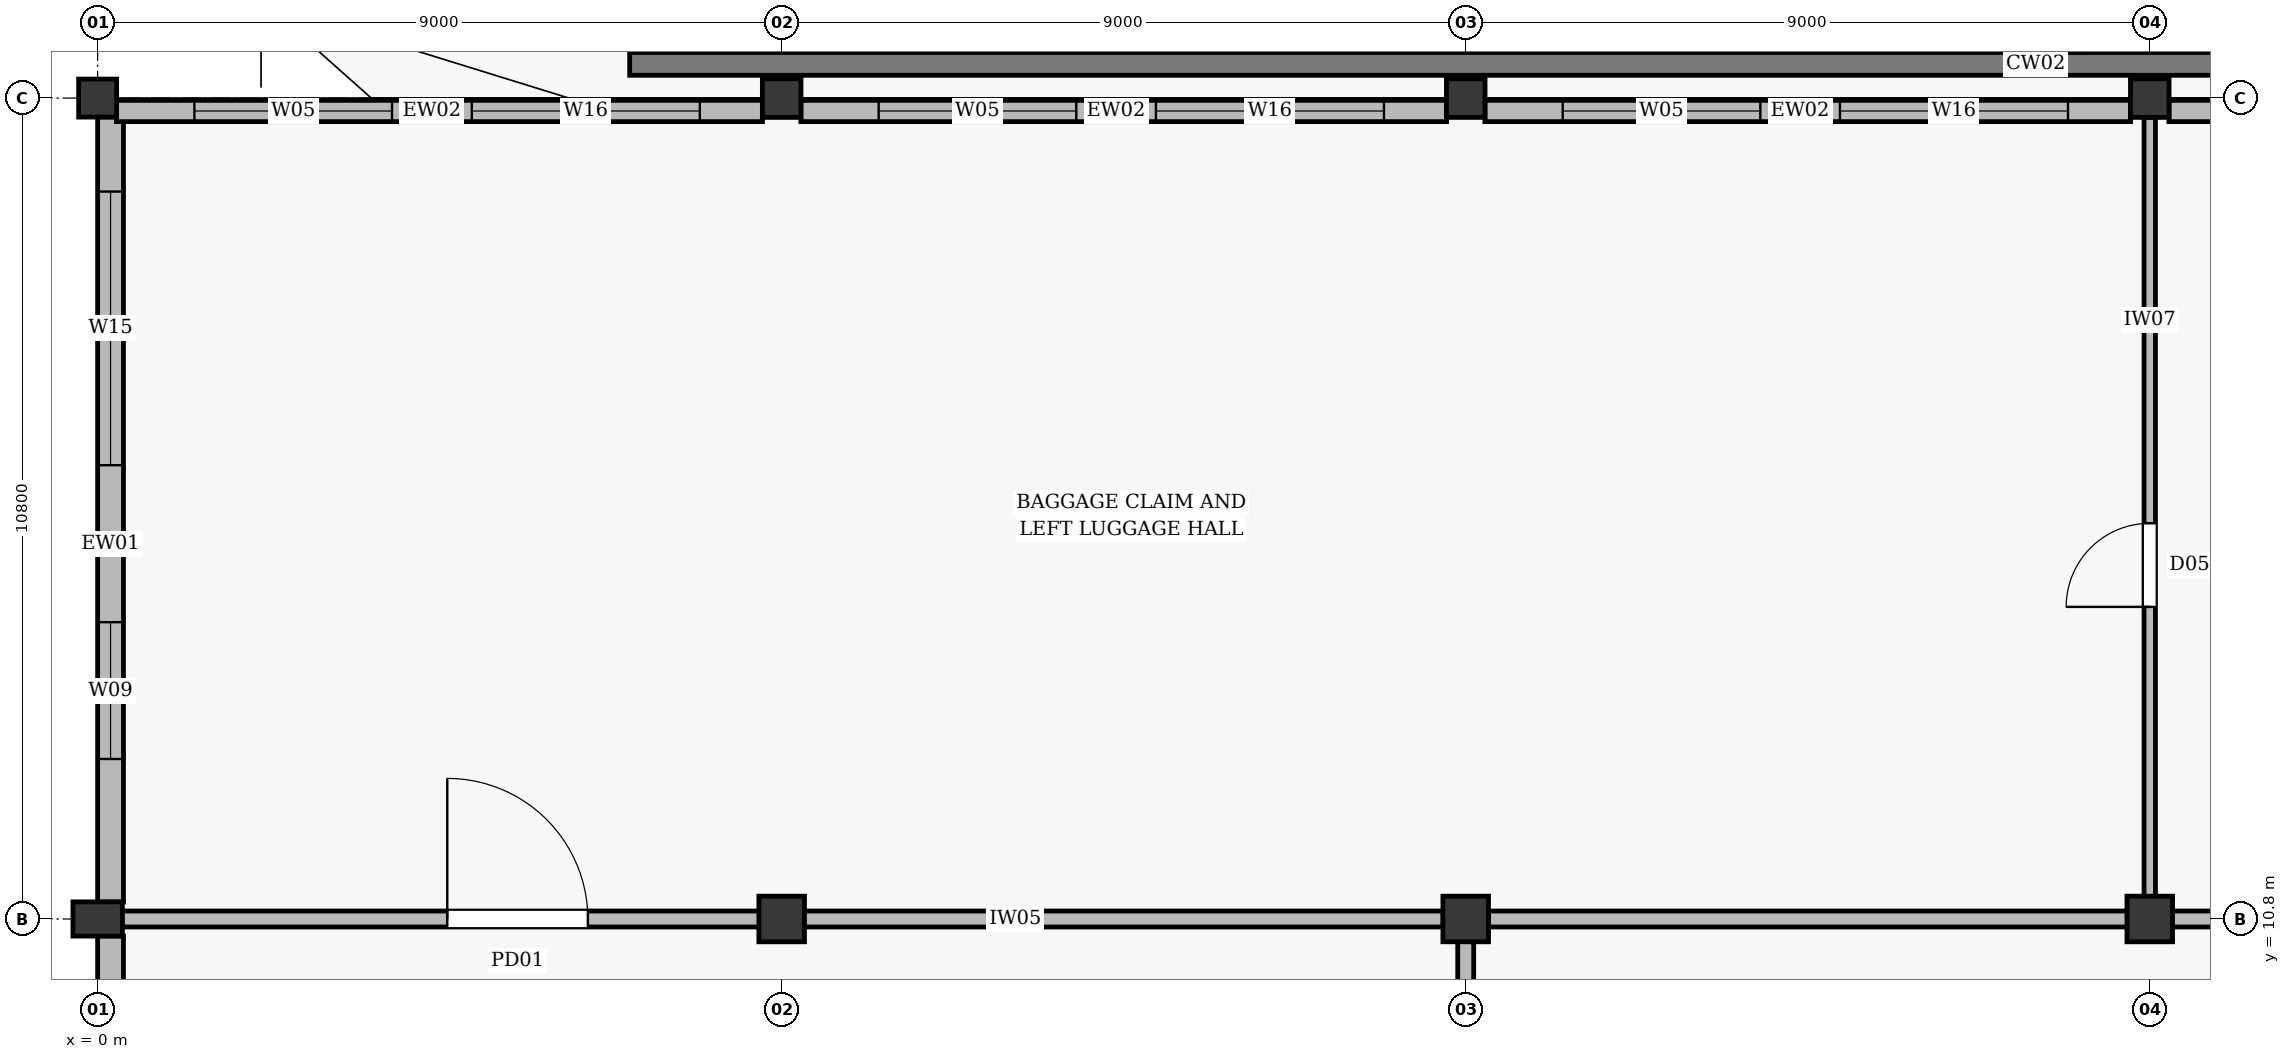
"""IFC4 building model, lengths in metres.
Left out: names, types, materials, properties, quantities, classifications, styles, units other than length and angle.
Written with IfcOpenShell. Run it as: python <this file> out.ifc"""

import sys

from ifc_helpers import new_model, si_unit, direction, frame, frame_2d, origin, origin_2d, place, context, subcontext, project, spatial, rectangle, hollow_rectangle, hollow_circle, extrude, element, fill, save


model = new_model("IFC4")
c1 = context("Model", 3, precision=1e-05, world=origin(), true_north=direction((0.0, 1.0)))
c2 = subcontext(c1, "Body", "Model", "MODEL_VIEW")
j1 = project(units=[si_unit("LENGTHUNIT", "METRE"), si_unit("PLANEANGLEUNIT", "RADIAN")], contexts=[c1])
p1 = place(None, origin())
s1 = spatial("IfcSite", under=j1, at=p1, CompositionType="ELEMENT")
p2 = place(p1, origin())
s2 = spatial("IfcBuilding", under=s1, at=p2, CompositionType="ELEMENT")
p3 = place(p2, origin())
s3 = spatial("IfcBuildingStorey", under=s2, at=p3, CompositionType="ELEMENT", Elevation=0.0)
p4 = place(p3, frame((0.0, 21.6, 0.0), z_axis=(0.0, 0.0, 1.0), x_axis=(1.0, 0.0, 0.0)))
e1 = element("IfcColumn", 1, at=p4, inside=s3, PredefinedType="COLUMN", context=c2, shape_type="SweptSolid", body=[
    extrude(hollow_rectangle(XDim=0.5, YDim=0.5, WallThickness=0.02, at=origin_2d()), origin(), (0.0, 0.0, 1.0), 6.6),
])
for number, where, z_axis, x_axis in (
    (2, (9.0, 21.6, 0.0), (0.0, 0.0, 1.0), (1.0, 0.0, 0.0)),
    (3, (18.0, 21.6, 0.0), (0.0, 0.0, 1.0), (1.0, 0.0, 0.0)),
    (4, (27.0, 21.6, 0.0), (0.0, 0.0, 1.0), (1.0, 0.0, 0.0)),
):
    element("IfcColumn", number, at=place(p3, frame(where, z_axis=z_axis, x_axis=x_axis)), inside=s3, PredefinedType="COLUMN", context=c2, shape_type="SweptSolid", body=[
        extrude(hollow_circle(Radius=0.254, WallThickness=0.016, at=origin_2d()), origin(), (0.0, 0.0, 1.0), 6.6),
    ])
p5 = place(p3, frame((0.0, 10.8, 0.0), z_axis=(0.0, 0.0, 1.0), x_axis=(1.0, 0.0, 0.0)))
e5 = element("IfcColumn", 5, at=p5, inside=s3, PredefinedType="PILASTER", context=c2, shape_type="SweptSolid", body=[
    extrude(rectangle(XDim=0.65, YDim=0.45, at=origin_2d()), origin(), (0.0, 0.0, 1.0), 6.6),
])
for number, where, z_axis, x_axis in (
    (6, (9.0, 10.8, 0.0), (0.0, 0.0, 1.0), (1.0, 0.0, 0.0)),
    (7, (18.0, 10.8, 0.0), (0.0, 0.0, 1.0), (1.0, 0.0, 0.0)),
    (8, (27.0, 10.8, 0.0), (0.0, 0.0, 1.0), (1.0, 0.0, 0.0)),
):
    element("IfcColumn", number, at=place(p3, frame(where, z_axis=z_axis, x_axis=x_axis)), inside=s3, PredefinedType="COLUMN", context=c2, shape_type="SweptSolid", body=[
        extrude(rectangle(XDim=0.6, YDim=0.6, at=origin_2d()), origin(), (0.0, 0.0, 1.0), 6.6),
    ])
p6 = place(p3, frame((7.0, 22.05, 0.0), z_axis=(0.0, 0.0, 1.0), x_axis=(1.0, 0.0, 0.0)))
e9 = element("IfcWall", 9, at=p6, inside=s3, PredefinedType="SOLIDWALL", context=c2, shape_type="SweptSolid", body=[
    extrude(rectangle(XDim=37.0, YDim=0.3, at=frame_2d((18.5, 0.0))), origin(), (0.0, 0.0, 1.0), 0.375),
])
p7 = place(p3, frame((26.0, 22.2, 0.0), z_axis=(0.0, 0.0, 1.0), x_axis=(0.0, 1.0, 0.0)))
e10 = element("IfcWall", 10, at=p7, inside=s3, PredefinedType="SOLIDWALL", context=c2, shape_type="SweptSolid", body=[
    extrude(rectangle(XDim=4.8, YDim=0.3, at=frame_2d((2.4, 0.0))), origin(), (0.0, 0.0, 1.0), 0.375),
])
p8 = place(p3, frame((0.17, 0.223, 0.0), z_axis=(0.0, 0.0, 1.0), x_axis=(0.0, 1.0, 0.0)))
e11 = element("IfcWall", 11, at=p8, inside=s3, PredefinedType="STANDARD", context=c2, shape_type="SweptSolid", body=[
    extrude(rectangle(XDim=10.354, YDim=0.34, at=frame_2d((5.177, 0.0))), origin(), (0.0, 0.0, 1.0), 5.55),
])
p9 = place(p8, frame((1.888, 0.0, 0.75)))
e12 = element("IfcOpeningElement", 12, at=p9, cuts=e11, PredefinedType="OPENING", context=c2, shape_type="SweptSolid", body=[
    extrude(rectangle(XDim=1.8, YDim=2.2, at=frame_2d((0.9, 1.1))), frame((0.0, 0.182, 0.0), z_axis=(0.0, -1.0, 0.0), x_axis=(1.0, 0.0, 0.0)), (0.0, 0.0, 1.0), 0.364),
])
p10 = place(p8, frame((5.765, 0.0, 1.05)))
e13 = element("IfcOpeningElement", 13, at=p10, cuts=e11, PredefinedType="OPENING", context=c2, shape_type="SweptSolid", body=[
    extrude(rectangle(XDim=3.6, YDim=1.4, at=frame_2d((1.8, 0.7))), frame((0.0, 0.182, 0.0), z_axis=(0.0, -1.0, 0.0), x_axis=(1.0, 0.0, 0.0)), (0.0, 0.0, 1.0), 0.364),
])
p11 = place(p3, frame((0.17, 11.023, 0.0), z_axis=(0.0, 0.0, 1.0), x_axis=(0.0, 1.0, 0.0)))
e14 = element("IfcWall", 14, at=p11, inside=s3, PredefinedType="STANDARD", context=c2, shape_type="SweptSolid", body=[
    extrude(rectangle(XDim=10.329, YDim=0.34, at=frame_2d((5.165, 0.0))), origin(), (0.0, 0.0, 1.0), 5.55),
])
p12 = place(p11, frame((1.882, 0.0, 0.75)))
e15 = element("IfcOpeningElement", 15, at=p12, cuts=e14, PredefinedType="OPENING", context=c2, shape_type="SweptSolid", body=[
    extrude(rectangle(XDim=1.8, YDim=2.2, at=frame_2d((0.9, 1.1))), frame((0.0, 0.182, 0.0), z_axis=(0.0, -1.0, 0.0), x_axis=(1.0, 0.0, 0.0)), (0.0, 0.0, 1.0), 0.364),
])
p13 = place(p11, frame((5.747, 0.0, 1.05)))
e16 = element("IfcOpeningElement", 16, at=p13, cuts=e14, PredefinedType="OPENING", context=c2, shape_type="SweptSolid", body=[
    extrude(rectangle(XDim=3.6, YDim=1.4, at=frame_2d((1.8, 0.7))), frame((0.0, 0.182, 0.0), z_axis=(0.0, -1.0, 0.0), x_axis=(1.0, 0.0, 0.0)), (0.0, 0.0, 1.0), 0.364),
])
p14 = place(p3, frame((0.248, 21.43, 0.0), z_axis=(0.0, 0.0, 1.0), x_axis=(1.0, 0.0, 0.0)))
e17 = element("IfcWall", 17, at=p14, inside=s3, PredefinedType="STANDARD", context=c2, shape_type="SweptSolid", body=[
    extrude(rectangle(XDim=8.5, YDim=0.28, at=frame_2d((4.25, 0.0))), origin(), (0.0, 0.0, 1.0), 5.55),
])
p15 = place(p14, frame((1.025, 0.0, 0.75)))
e18 = element("IfcOpeningElement", 18, at=p15, cuts=e17, PredefinedType="OPENING", context=c2, shape_type="SweptSolid", body=[
    extrude(rectangle(XDim=2.6, YDim=2.4, at=frame_2d((1.3, 1.2))), frame((0.0, 0.152, 0.0), z_axis=(0.0, -1.0, 0.0), x_axis=(1.0, 0.0, 0.0)), (0.0, 0.0, 1.0), 0.304),
])
p16 = place(p14, frame((4.675, 0.0, 1.05)))
e19 = element("IfcOpeningElement", 19, at=p16, cuts=e17, PredefinedType="OPENING", context=c2, shape_type="SweptSolid", body=[
    extrude(rectangle(XDim=3.0, YDim=1.2, at=frame_2d((1.5, 0.6))), frame((0.0, 0.152, 0.0), z_axis=(0.0, -1.0, 0.0), x_axis=(1.0, 0.0, 0.0)), (0.0, 0.0, 1.0), 0.304),
])
p17 = place(p3, frame((9.252, 21.43, 0.0), z_axis=(0.0, 0.0, 1.0), x_axis=(1.0, 0.0, 0.0)))
e20 = element("IfcWall", 20, at=p17, inside=s3, PredefinedType="STANDARD", context=c2, shape_type="SweptSolid", body=[
    extrude(rectangle(XDim=8.496, YDim=0.28, at=frame_2d((4.248, 0.0))), origin(), (0.0, 0.0, 1.0), 5.55),
])
p18 = place(p17, frame((1.024, 0.0, 0.75)))
e21 = element("IfcOpeningElement", 21, at=p18, cuts=e20, PredefinedType="OPENING", context=c2, shape_type="SweptSolid", body=[
    extrude(rectangle(XDim=2.6, YDim=2.4, at=frame_2d((1.3, 1.2))), frame((0.0, 0.152, 0.0), z_axis=(0.0, -1.0, 0.0), x_axis=(1.0, 0.0, 0.0)), (0.0, 0.0, 1.0), 0.304),
])
p19 = place(p17, frame((4.672, 0.0, 1.05)))
e22 = element("IfcOpeningElement", 22, at=p19, cuts=e20, PredefinedType="OPENING", context=c2, shape_type="SweptSolid", body=[
    extrude(rectangle(XDim=3.0, YDim=1.2, at=frame_2d((1.5, 0.6))), frame((0.0, 0.152, 0.0), z_axis=(0.0, -1.0, 0.0), x_axis=(1.0, 0.0, 0.0)), (0.0, 0.0, 1.0), 0.304),
])
p20 = place(p3, frame((18.252, 21.43, 0.0), z_axis=(0.0, 0.0, 1.0), x_axis=(1.0, 0.0, 0.0)))
e23 = element("IfcWall", 23, at=p20, inside=s3, PredefinedType="STANDARD", context=c2, shape_type="SweptSolid", body=[
    extrude(rectangle(XDim=8.496, YDim=0.28, at=frame_2d((4.248, 0.0))), origin(), (0.0, 0.0, 1.0), 5.55),
])
p21 = place(p20, frame((1.024, 0.0, 0.75)))
e24 = element("IfcOpeningElement", 24, at=p21, cuts=e23, PredefinedType="OPENING", context=c2, shape_type="SweptSolid", body=[
    extrude(rectangle(XDim=2.6, YDim=2.4, at=frame_2d((1.3, 1.2))), frame((0.0, 0.152, 0.0), z_axis=(0.0, -1.0, 0.0), x_axis=(1.0, 0.0, 0.0)), (0.0, 0.0, 1.0), 0.304),
])
p22 = place(p20, frame((4.672, 0.0, 1.05)))
e25 = element("IfcOpeningElement", 25, at=p22, cuts=e23, PredefinedType="OPENING", context=c2, shape_type="SweptSolid", body=[
    extrude(rectangle(XDim=3.0, YDim=1.2, at=frame_2d((1.5, 0.6))), frame((0.0, 0.152, 0.0), z_axis=(0.0, -1.0, 0.0), x_axis=(1.0, 0.0, 0.0)), (0.0, 0.0, 1.0), 0.304),
])
p23 = place(p3, frame((27.252, 21.43, 0.0), z_axis=(0.0, 0.0, 1.0), x_axis=(1.0, 0.0, 0.0)))
e26 = element("IfcWall", 26, at=p23, inside=s3, PredefinedType="STANDARD", context=c2, shape_type="SweptSolid", body=[
    extrude(rectangle(XDim=8.496, YDim=0.28, at=frame_2d((4.248, 0.0))), origin(), (0.0, 0.0, 1.0), 5.55),
])
p24 = place(p23, frame((1.024, 0.0, 0.75)))
e27 = element("IfcOpeningElement", 27, at=p24, cuts=e26, PredefinedType="OPENING", context=c2, shape_type="SweptSolid", body=[
    extrude(rectangle(XDim=2.6, YDim=2.4, at=frame_2d((1.3, 1.2))), frame((0.0, 0.152, 0.0), z_axis=(0.0, -1.0, 0.0), x_axis=(1.0, 0.0, 0.0)), (0.0, 0.0, 1.0), 0.304),
])
p25 = place(p23, frame((4.672, 0.0, 1.05)))
e28 = element("IfcOpeningElement", 28, at=p25, cuts=e26, PredefinedType="OPENING", context=c2, shape_type="SweptSolid", body=[
    extrude(rectangle(XDim=3.0, YDim=1.2, at=frame_2d((1.5, 0.6))), frame((0.0, 0.152, 0.0), z_axis=(0.0, -1.0, 0.0), x_axis=(1.0, 0.0, 0.0)), (0.0, 0.0, 1.0), 0.304),
])
p26 = place(p3, frame((0.323, 10.8, 0.0), z_axis=(0.0, 0.0, 1.0), x_axis=(1.0, 0.0, 0.0)))
e29 = element("IfcWall", 29, at=p26, inside=s3, PredefinedType="PARTITIONING", context=c2, shape_type="SweptSolid", body=[
    extrude(rectangle(XDim=17.379, YDim=0.21, at=frame_2d((8.689, 0.0))), origin(), (0.0, 0.0, 1.0), 5.93),
])
p27 = place(p26, frame((4.277, 0.0, 0.005)))
e30 = element("IfcOpeningElement", 30, at=p27, cuts=e29, PredefinedType="OPENING", context=c2, shape_type="SweptSolid", body=[
    extrude(rectangle(XDim=1.85, YDim=2.35, at=frame_2d((0.925, 1.175))), frame((0.0, 0.117, 0.0), z_axis=(0.0, -1.0, 0.0), x_axis=(1.0, 0.0, 0.0)), (0.0, 0.0, 1.0), 0.234),
])
p28 = place(p3, frame((18.298, 10.8, 0.0), z_axis=(0.0, 0.0, 1.0), x_axis=(1.0, 0.0, 0.0)))
e31 = element("IfcWall", 31, at=p28, inside=s3, PredefinedType="PARTITIONING", context=c2, shape_type="SweptSolid", body=[
    extrude(rectangle(XDim=26.379, YDim=0.21, at=frame_2d((13.189, 0.0))), origin(), (0.0, 0.0, 1.0), 5.93),
])
p29 = place(p28, frame((11.502, 0.0, 0.005)))
e32 = element("IfcOpeningElement", 32, at=p29, cuts=e31, PredefinedType="OPENING", context=c2, shape_type="SweptSolid", body=[
    extrude(rectangle(XDim=1.5, YDim=2.25, at=frame_2d((0.75, 1.125))), frame((0.0, 0.117, 0.0), z_axis=(0.0, -1.0, 0.0), x_axis=(1.0, 0.0, 0.0)), (0.0, 0.0, 1.0), 0.234),
])
p30 = place(p3, frame((27.0, 10.903, 0.0), z_axis=(0.0, 0.0, 1.0), x_axis=(0.0, 1.0, 0.0)))
e33 = element("IfcWall", 33, at=p30, inside=s3, PredefinedType="PARTITIONING", context=c2, shape_type="SweptSolid", body=[
    extrude(rectangle(XDim=10.445, YDim=0.15, at=frame_2d((5.222, 0.0))), origin(), (0.0, 0.0, 1.0), 5.57),
])
p31 = place(p30, frame((4.003, 0.0, 0.005)))
e34 = element("IfcOpeningElement", 34, at=p31, cuts=e33, PredefinedType="OPENING", context=c2, shape_type="SweptSolid", body=[
    extrude(rectangle(XDim=1.1, YDim=2.1, at=frame_2d((0.55, 1.05))), frame((0.0, 0.087, 0.0), z_axis=(0.0, -1.0, 0.0), x_axis=(1.0, 0.0, 0.0)), (0.0, 0.0, 1.0), 0.174),
])
p32 = place(p3, frame((18.0, 0.223, 0.0), z_axis=(0.0, 0.0, 1.0), x_axis=(0.0, 1.0, 0.0)))
e35 = element("IfcWall", 35, at=p32, inside=s3, PredefinedType="PARTITIONING", context=c2, shape_type="SweptSolid", body=[
    extrude(rectangle(XDim=10.477, YDim=0.21, at=frame_2d((5.239, 0.0))), origin(), (0.0, 0.0, 1.0), 5.57),
])
p33 = place(p32, frame((4.577, 0.0, 0.005)))
e36 = element("IfcOpeningElement", 36, at=p33, cuts=e35, PredefinedType="OPENING", context=c2, shape_type="SweptSolid", body=[
    extrude(rectangle(XDim=1.5, YDim=2.25, at=frame_2d((0.75, 1.125))), frame((0.0, 0.117, 0.0), z_axis=(0.0, -1.0, 0.0), x_axis=(1.0, 0.0, 0.0)), (0.0, 0.0, 1.0), 0.234),
])
p34 = place(p12, origin())
e37 = element("IfcWindow", 37, at=p34, inside=s3, PartitioningType="DOUBLE_PANEL_VERTICAL", PredefinedType="WINDOW", context=c2, shape_type="SweptSolid", body=[
    extrude(rectangle(XDim=1.8, YDim=2.2, at=frame_2d((0.9, 1.1))), frame((0.0, 0.03, 0.0), z_axis=(0.0, -1.0, 0.0), x_axis=(1.0, 0.0, 0.0)), (0.0, 0.0, 1.0), 0.06),
])
fill(e15, e37)
p35 = place(p13, origin())
e38 = element("IfcWindow", 38, at=p35, inside=s3, PartitioningType="DOUBLE_PANEL_VERTICAL", PredefinedType="WINDOW", context=c2, shape_type="SweptSolid", body=[
    extrude(rectangle(XDim=3.6, YDim=1.4, at=frame_2d((1.8, 0.7))), frame((0.0, 0.03, 0.0), z_axis=(0.0, -1.0, 0.0), x_axis=(1.0, 0.0, 0.0)), (0.0, 0.0, 1.0), 0.06),
])
fill(e16, e38)
p36 = place(p15, origin())
e39 = element("IfcWindow", 39, at=p36, inside=s3, PartitioningType="DOUBLE_PANEL_VERTICAL", PredefinedType="WINDOW", context=c2, shape_type="SweptSolid", body=[
    extrude(rectangle(XDim=2.6, YDim=2.4, at=frame_2d((1.3, 1.2))), frame((0.0, 0.03, 0.0), z_axis=(0.0, -1.0, 0.0), x_axis=(1.0, 0.0, 0.0)), (0.0, 0.0, 1.0), 0.06),
])
fill(e18, e39)
p37 = place(p16, origin())
e40 = element("IfcWindow", 40, at=p37, inside=s3, PartitioningType="DOUBLE_PANEL_VERTICAL", PredefinedType="WINDOW", context=c2, shape_type="SweptSolid", body=[
    extrude(rectangle(XDim=3.0, YDim=1.2, at=frame_2d((1.5, 0.6))), frame((0.0, 0.03, 0.0), z_axis=(0.0, -1.0, 0.0), x_axis=(1.0, 0.0, 0.0)), (0.0, 0.0, 1.0), 0.06),
])
fill(e19, e40)
p38 = place(p18, origin())
e41 = element("IfcWindow", 41, at=p38, inside=s3, PartitioningType="DOUBLE_PANEL_VERTICAL", PredefinedType="WINDOW", context=c2, shape_type="SweptSolid", body=[
    extrude(rectangle(XDim=2.6, YDim=2.4, at=frame_2d((1.3, 1.2))), frame((0.0, 0.03, 0.0), z_axis=(0.0, -1.0, 0.0), x_axis=(1.0, 0.0, 0.0)), (0.0, 0.0, 1.0), 0.06),
])
fill(e21, e41)
p39 = place(p19, origin())
e42 = element("IfcWindow", 42, at=p39, inside=s3, PartitioningType="DOUBLE_PANEL_VERTICAL", PredefinedType="WINDOW", context=c2, shape_type="SweptSolid", body=[
    extrude(rectangle(XDim=3.0, YDim=1.2, at=frame_2d((1.5, 0.6))), frame((0.0, 0.03, 0.0), z_axis=(0.0, -1.0, 0.0), x_axis=(1.0, 0.0, 0.0)), (0.0, 0.0, 1.0), 0.06),
])
fill(e22, e42)
p40 = place(p21, origin())
e43 = element("IfcWindow", 43, at=p40, inside=s3, PartitioningType="DOUBLE_PANEL_VERTICAL", PredefinedType="WINDOW", context=c2, shape_type="SweptSolid", body=[
    extrude(rectangle(XDim=2.6, YDim=2.4, at=frame_2d((1.3, 1.2))), frame((0.0, 0.03, 0.0), z_axis=(0.0, -1.0, 0.0), x_axis=(1.0, 0.0, 0.0)), (0.0, 0.0, 1.0), 0.06),
])
fill(e24, e43)
p41 = place(p22, origin())
e44 = element("IfcWindow", 44, at=p41, inside=s3, PartitioningType="DOUBLE_PANEL_VERTICAL", PredefinedType="WINDOW", context=c2, shape_type="SweptSolid", body=[
    extrude(rectangle(XDim=3.0, YDim=1.2, at=frame_2d((1.5, 0.6))), frame((0.0, 0.03, 0.0), z_axis=(0.0, -1.0, 0.0), x_axis=(1.0, 0.0, 0.0)), (0.0, 0.0, 1.0), 0.06),
])
fill(e25, e44)
p42 = place(p27, origin())
e45 = element("IfcDoor", 45, at=p42, inside=s3, OperationType="DOUBLE_DOOR_SINGLE_SWING", PredefinedType="DOOR", context=c2, shape_type="SweptSolid", body=[
    extrude(rectangle(XDim=1.85, YDim=2.35, at=frame_2d((0.925, 1.175))), frame((0.0, 0.025, 0.0), z_axis=(0.0, -1.0, 0.0), x_axis=(1.0, 0.0, 0.0)), (0.0, 0.0, 1.0), 0.05),
])
fill(e30, e45)
p43 = place(p31, origin())
e46 = element("IfcDoor", 46, at=p43, inside=s3, OperationType="SINGLE_SWING_LEFT", PredefinedType="DOOR", context=c2, shape_type="SweptSolid", body=[
    extrude(rectangle(XDim=1.1, YDim=2.1, at=frame_2d((0.55, 1.05))), frame((0.0, 0.025, 0.0), z_axis=(0.0, -1.0, 0.0), x_axis=(1.0, 0.0, 0.0)), (0.0, 0.0, 1.0), 0.05),
])
fill(e34, e46)
save(model, sys.argv[1])
